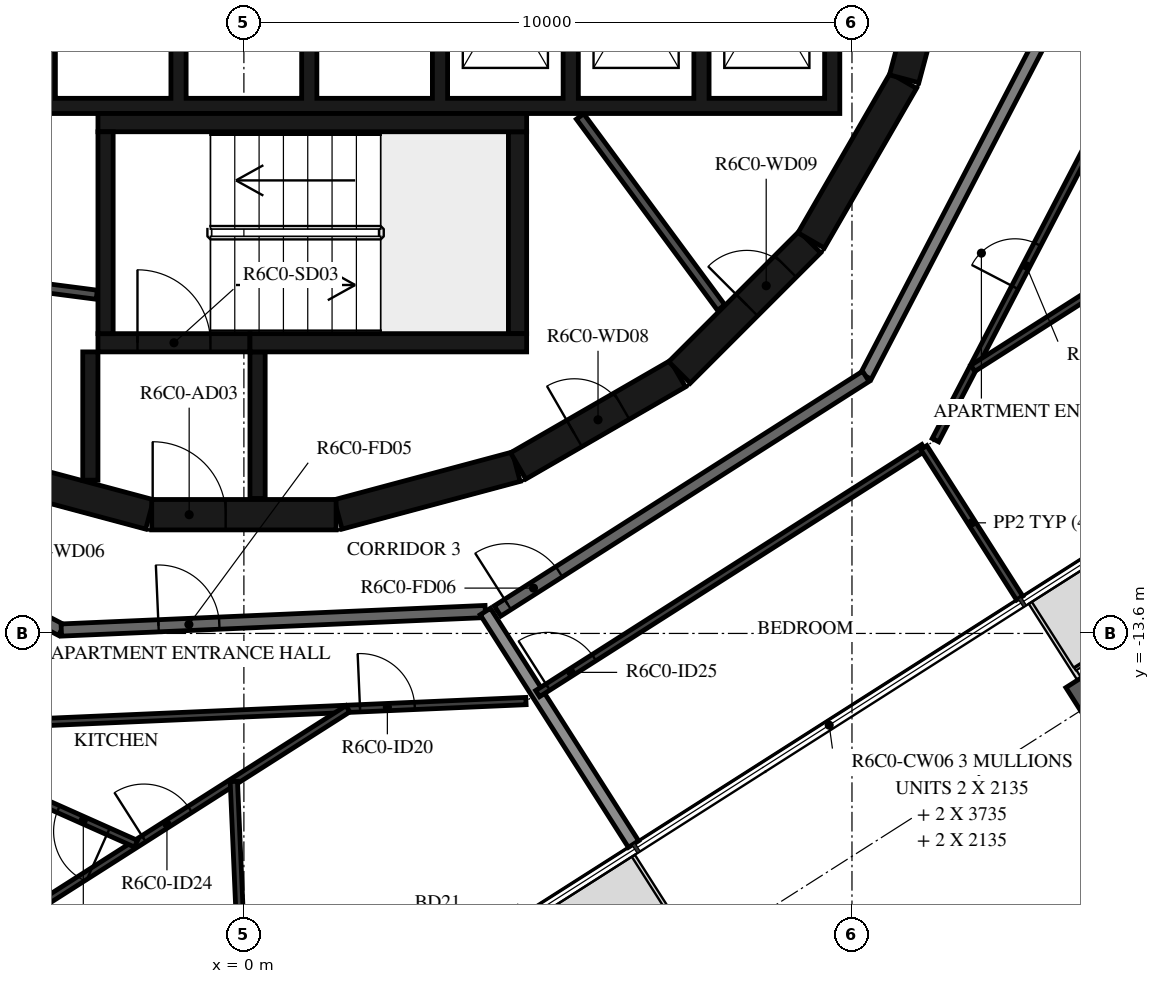
"""IFC4 building model, lengths in metres.
Left out: names, types, materials, properties, quantities, classifications, styles, units other than length and angle.
Written with IfcOpenShell. Run it as: python <this file> out.ifc"""

import sys

from ifc_helpers import new_model, si_unit, direction, frame, frame_2d, origin, origin_2d, place, context, subcontext, project, spatial, polyline, rectangle, i_section, outline, extrude, element, fill, save


model = new_model("IFC4")
c1 = context("Model", 3, precision=1e-05, world=origin(), true_north=direction((0.0, 1.0)))
c2 = subcontext(c1, "Body", "Model", "MODEL_VIEW")
j1 = project(units=[si_unit("LENGTHUNIT", "METRE"), si_unit("PLANEANGLEUNIT", "RADIAN")], contexts=[c1])
p1 = place(None, origin())
s1 = spatial("IfcSite", under=j1, at=p1, CompositionType="ELEMENT")
p2 = place(p1, origin())
s2 = spatial("IfcBuilding", under=s1, at=p2, CompositionType="ELEMENT")
p3 = place(p2, frame((0.0, 0.0, 247.7)))
s3 = spatial("IfcBuildingStorey", under=s2, at=p3, CompositionType="ELEMENT", Elevation=247.7)
p4 = place(p3, frame((13.886, -14.79, -0.38), z_axis=(0.0, 0.0, 1.0), x_axis=(-0.843391139633, -0.537300088953, 0.0)))
e1 = element("IfcColumn", 1, at=p4, inside=s3, PredefinedType="COLUMN", context=c2, shape_type="SweptSolid", body=[
    extrude(i_section(OverallWidth=0.3, OverallDepth=0.9, WebThickness=0.019, FlangeThickness=0.035, FilletRadius=0.03, at=origin_2d()), origin(), (0.0, 0.0, 1.0), 3.5),
])
p5 = place(p3, frame((1.55, -11.643, 0.0), z_axis=(0.0, 0.0, 1.0), x_axis=(0.965948410781, 0.258734743916, 0.0)))
e2 = element("IfcWall", 2, at=p5, inside=s3, PredefinedType="SHEAR", context=c2, shape_type="SweptSolid", body=[
    extrude(rectangle(XDim=3.033, YDim=0.5, at=frame_2d((1.516, 0.0))), origin(), (0.0, 0.0, 1.0), 3.12),
])
p6 = place(p3, frame((4.51, -10.845, 0.0), z_axis=(0.0, 0.0, 1.0), x_axis=(0.865975092491, 0.500087131594, 0.0)))
e3 = element("IfcWall", 3, at=p6, inside=s3, PredefinedType="SHEAR", context=c2, shape_type="SweptSolid", body=[
    extrude(rectangle(XDim=3.033, YDim=0.5, at=frame_2d((1.516, 0.0))), origin(), (0.0, 0.0, 1.0), 3.12),
])
p7 = place(p6, frame((1.066, 0.0, 0.0)))
e4 = element("IfcOpeningElement", 4, at=p7, cuts=e3, PredefinedType="OPENING", context=c2, shape_type="SweptSolid", body=[
    extrude(rectangle(XDim=0.9, YDim=2.1, at=frame_2d((0.45, 1.05))), frame((0.0, 0.26, 0.0), z_axis=(0.0, -1.0, 0.0), x_axis=(1.0, 0.0, 0.0)), (0.0, 0.0, 1.0), 0.52),
])
p8 = place(p3, frame((7.164, -9.308, 0.0), z_axis=(0.0, 0.0, 1.0), x_axis=(0.707106781187, 0.707106781187, 0.0)))
e5 = element("IfcWall", 5, at=p8, inside=s3, PredefinedType="SHEAR", context=c2, shape_type="SweptSolid", body=[
    extrude(rectangle(XDim=3.032, YDim=0.5, at=frame_2d((1.516, 0.0))), origin(), (0.0, 0.0, 1.0), 3.12),
])
p9 = place(p8, frame((1.566, 0.0, 0.0)))
e6 = element("IfcOpeningElement", 6, at=p9, cuts=e5, PredefinedType="OPENING", context=c2, shape_type="SweptSolid", body=[
    extrude(rectangle(XDim=0.9, YDim=2.1, at=frame_2d((0.45, 1.05))), frame((0.0, 0.26, 0.0), z_axis=(0.0, -1.0, 0.0), x_axis=(1.0, 0.0, 0.0)), (0.0, 0.0, 1.0), 0.52),
])
for number, where, z_axis, x_axis in (
    (7, (9.329, -7.137, 0.0), (0.0, 0.0, 1.0), (0.5, 0.866, 0.0)),
    (8, (10.858, -4.479, 0.0), (0.0, 0.0, 1.0), (0.259, 0.966, 0.0)),
    (9, (-4.479, -10.858, 0.0), (0.0, 0.0, 1.0), (0.966, -0.259, 0.0)),
):
    element("IfcWall", number, at=place(p3, frame(where, z_axis=z_axis, x_axis=x_axis)), inside=s3, PredefinedType="SHEAR", context=c2, shape_type="SweptSolid", body=[
        extrude(rectangle(XDim=3.033, YDim=0.5, at=frame_2d((1.516, 0.0))), origin(), (0.0, 0.0, 1.0), 3.12),
    ])
p10 = place(p3, frame((-1.516, -11.647, 0.0), z_axis=(0.0, 0.0, 1.0), x_axis=(1.0, 0.0, 0.0)))
e10 = element("IfcWall", 10, at=p10, inside=s3, PredefinedType="SHEAR", context=c2, shape_type="SweptSolid", body=[
    extrude(rectangle(XDim=3.033, YDim=0.5, at=frame_2d((1.516, 0.0))), origin(), (0.0, 0.0, 1.0), 3.12),
])
p11 = place(p10, frame((0.016, 0.0, 0.0)))
e11 = element("IfcOpeningElement", 11, at=p11, cuts=e10, PredefinedType="OPENING", context=c2, shape_type="SweptSolid", body=[
    extrude(rectangle(XDim=1.2, YDim=2.1, at=frame_2d((0.6, 1.05))), frame((0.0, 0.26, 0.0), z_axis=(0.0, -1.0, 0.0), x_axis=(1.0, 0.0, 0.0)), (0.0, 0.0, 1.0), 0.52),
])
p12 = place(p3, frame((-2.275, -8.67, 0.0), z_axis=(0.0, 0.0, 1.0), x_axis=(0.0, 1.0, 0.0)))
e12 = element("IfcWall", 12, at=p12, inside=s3, PredefinedType="SHEAR", context=c2, shape_type="SweptSolid", body=[
    extrude(rectangle(XDim=3.32, YDim=0.25, at=frame_2d((1.66, 0.0))), origin(), (0.0, 0.0, 1.0), 3.12),
])
p13 = place(p3, frame((-2.4, -5.2, 0.0), z_axis=(0.0, 0.0, 1.0), x_axis=(1.0, 0.0, 0.0)))
e13 = element("IfcWall", 13, at=p13, inside=s3, PredefinedType="SHEAR", context=c2, shape_type="SweptSolid", body=[
    extrude(rectangle(XDim=7.05, YDim=0.3, at=frame_2d((3.525, 0.0))), origin(), (0.0, 0.0, 1.0), 3.12),
])
p14 = place(p3, frame((4.5, -8.67, 0.0), z_axis=(0.0, 0.0, 1.0), x_axis=(0.0, 1.0, 0.0)))
e14 = element("IfcWall", 14, at=p14, inside=s3, PredefinedType="SHEAR", context=c2, shape_type="SweptSolid", body=[
    extrude(rectangle(XDim=3.32, YDim=0.3, at=frame_2d((1.66, 0.0))), origin(), (0.0, 0.0, 1.0), 3.12),
])
p15 = place(p3, frame((0.1, -8.82, 0.0), z_axis=(0.0, 0.0, 1.0), x_axis=(1.0, 0.0, 0.0)))
e15 = element("IfcWall", 15, at=p15, inside=s3, PredefinedType="SHEAR", context=c2, shape_type="SweptSolid", body=[
    extrude(rectangle(XDim=4.55, YDim=0.3, at=frame_2d((2.275, 0.0))), origin(), (0.0, 0.0, 1.0), 3.12),
])
p16 = place(p3, frame((-2.4, -8.82, 0.0), z_axis=(0.0, 0.0, 1.0), x_axis=(1.0, 0.0, 0.0)))
e16 = element("IfcWall", 16, at=p16, inside=s3, PredefinedType="SHEAR", context=c2, shape_type="SweptSolid", body=[
    extrude(rectangle(XDim=2.5, YDim=0.3, at=frame_2d((1.25, 0.0))), origin(), (0.0, 0.0, 1.0), 3.12),
])
p17 = place(p16, frame((0.65, 0.0, 0.0)))
e17 = element("IfcOpeningElement", 17, at=p17, cuts=e16, PredefinedType="OPENING", context=c2, shape_type="SweptSolid", body=[
    extrude(rectangle(XDim=1.2, YDim=2.1, at=frame_2d((0.6, 1.05))), frame((0.0, 0.16, 0.0), z_axis=(0.0, -1.0, 0.0), x_axis=(1.0, 0.0, 0.0)), (0.0, 0.0, 1.0), 0.32),
])
p18 = place(p3, frame((-2.525, -8.97, 0.0), z_axis=(0.0, 0.0, 1.0), x_axis=(0.0, -1.0, 0.0)))
e18 = element("IfcWall", 18, at=p18, inside=s3, PredefinedType="SHEAR", context=c2, shape_type="SweptSolid", body=[
    extrude(rectangle(XDim=2.11, YDim=0.25, at=frame_2d((1.055, 0.0))), origin(), (0.0, 0.0, 1.0), 3.12),
])
p19 = place(p3, frame((0.225, -8.97, 0.0), z_axis=(0.0, 0.0, 1.0), x_axis=(0.0, -1.0, 0.0)))
e19 = element("IfcWall", 19, at=p19, inside=s3, PredefinedType="SHEAR", context=c2, shape_type="SweptSolid", body=[
    extrude(rectangle(XDim=2.41, YDim=0.25, at=frame_2d((1.205, 0.0))), origin(), (0.0, 0.0, 1.0), 3.12),
])
p20 = place(p3, origin())
e20 = element("IfcWall", 20, at=p20, inside=s3, PredefinedType="SHEAR", context=c2, shape_type="SweptSolid", body=[
    extrude(outline(polyline([(9.8, -5.05), (9.8, -4.8), (9.8, -1.9), (9.55, -1.9), (9.55, -4.8), (7.65, -4.8), (7.65, -1.9), (7.4, -1.9), (7.4, -4.8), (5.5, -4.8), (5.5, -1.9), (5.25, -1.9), (5.25, -4.8), (3.35, -4.8), (3.35, -1.9), (3.1, -1.9), (3.1, -4.8), (1.2, -4.8), (1.2, -1.9), (0.95, -1.9), (0.95, -4.8), (-0.95, -4.8), (-0.95, -1.9), (-1.2, -1.9), (-1.2, -4.8), (-3.1, -4.8), (-3.1, -1.9), (-3.35, -1.9), (-3.35, -4.8), (-5.25, -4.8), (-5.25, -1.9), (-5.5, -1.9), (-5.5, -4.8), (-7.4, -4.8), (-7.4, -1.9), (-7.65, -1.9), (-7.65, -4.8), (-9.55, -4.8), (-9.55, -1.9), (-9.8, -1.9), (-9.8, -4.8), (-9.8, -5.05), (9.8, -5.05)])), origin(), (0.0, 0.0, 1.0), 3.12),
])
p21 = place(p3, frame((5.528, -5.098, 0.0), z_axis=(0.0, 0.0, 1.0), x_axis=(0.594034318069, -0.804439698769, 0.0)))
e21 = element("IfcWall", 21, at=p21, inside=s3, PredefinedType="PARTITIONING", context=c2, shape_type="SweptSolid", body=[
    extrude(rectangle(XDim=3.907, YDim=0.15, at=frame_2d((1.953, 0.0))), origin(), (0.0, 0.0, 1.0), 3.12),
])
p22 = place(p3, frame((-4.198, -7.799, 0.0), z_axis=(0.0, 0.0, 1.0), x_axis=(0.991686747293, -0.128675542523, 0.0)))
e22 = element("IfcWall", 22, at=p22, inside=s3, PredefinedType="PARTITIONING", context=c2, shape_type="SweptSolid", body=[
    extrude(rectangle(XDim=1.793, YDim=0.15, at=frame_2d((0.896, 0.0))), origin(), (0.0, 0.0, 1.0), 3.12),
])
p23 = place(p3, frame((10.228, -9.372, 0.0), z_axis=(0.0, 0.0, 1.0), x_axis=(0.461759464021, 0.887005184532, 0.0)))
e23 = element("IfcWall", 23, at=p23, inside=s3, PredefinedType="STANDARD", context=c2, shape_type="SweptSolid", body=[
    extrude(rectangle(XDim=7.181, YDim=0.2, at=frame_2d((3.591, 0.0))), origin(), (0.0, 0.0, 1.0), 3.12),
])
p24 = place(p3, frame((-9.372, -10.228, 0.0), z_axis=(0.0, 0.0, 1.0), x_axis=(0.887005184532, -0.461759464021, 0.0)))
e24 = element("IfcWall", 24, at=p24, inside=s3, PredefinedType="STANDARD", context=c2, shape_type="SweptSolid", body=[
    extrude(rectangle(XDim=7.181, YDim=0.2, at=frame_2d((3.591, 0.0))), origin(), (0.0, 0.0, 1.0), 3.12),
])
p25 = place(p24, frame((2.391, 0.0, 0.0)))
e25 = element("IfcOpeningElement", 25, at=p25, cuts=e24, PredefinedType="OPENING", context=c2, shape_type="SweptSolid", body=[
    extrude(rectangle(XDim=1.0, YDim=2.1, at=frame_2d((0.5, 1.05))), frame((0.0, 0.11, 0.0), z_axis=(0.0, -1.0, 0.0), x_axis=(1.0, 0.0, 0.0)), (0.0, 0.0, 1.0), 0.22),
])
p26 = place(p3, frame((-3.003, -13.544, 0.0), z_axis=(0.0, 0.0, 1.0), x_axis=(0.999048221872, 0.043619380718, 0.0)))
e26 = element("IfcWall", 26, at=p26, inside=s3, PredefinedType="STANDARD", context=c2, shape_type="SweptSolid", body=[
    extrude(rectangle(XDim=6.979, YDim=0.2, at=frame_2d((3.49, 0.0))), origin(), (0.0, 0.0, 1.0), 3.12),
])
p27 = place(p26, frame((1.6, 0.0, 0.0)))
e27 = element("IfcOpeningElement", 27, at=p27, cuts=e26, PredefinedType="OPENING", context=c2, shape_type="SweptSolid", body=[
    extrude(rectangle(XDim=1.0, YDim=2.1, at=frame_2d((0.5, 1.05))), frame((0.0, 0.11, 0.0), z_axis=(0.0, -1.0, 0.0), x_axis=(1.0, 0.0, 0.0)), (0.0, 0.0, 1.0), 0.22),
])
p28 = place(p3, frame((4.172, -13.231, 0.0), z_axis=(0.0, 0.0, 1.0), x_axis=(0.843388394728, 0.537304397561, 0.0)))
e28 = element("IfcWall", 28, at=p28, inside=s3, PredefinedType="STANDARD", context=c2, shape_type="SweptSolid", body=[
    extrude(rectangle(XDim=7.181, YDim=0.2, at=frame_2d((3.59, 0.0))), origin(), (0.0, 0.0, 1.0), 3.12),
])
p29 = place(p28, frame((0.2, 0.0, 0.0)))
e29 = element("IfcOpeningElement", 29, at=p29, cuts=e28, PredefinedType="OPENING", context=c2, shape_type="SweptSolid", body=[
    extrude(rectangle(XDim=1.0, YDim=2.1, at=frame_2d((0.5, 1.05))), frame((0.0, 0.11, 0.0), z_axis=(0.0, -1.0, 0.0), x_axis=(1.0, 0.0, 0.0)), (0.0, 0.0, 1.0), 0.22),
])
p30 = place(p3, frame((6.407, -17.064, 0.0), z_axis=(0.0, 0.0, 1.0), x_axis=(-0.537324777979, 0.843375410461, 0.0)))
e30 = element("IfcWall", 30, at=p30, inside=s3, PredefinedType="STANDARD", context=c2, shape_type="SweptSolid", body=[
    extrude(rectangle(XDim=4.535, YDim=0.2, at=frame_2d((2.268, 0.0))), origin(), (0.0, 0.0, 1.0), 2.73),
])
p31 = place(p3, frame((-3.339, -15.06, 0.0), z_axis=(0.0, 0.0, 1.0), x_axis=(0.999047716945, 0.043630943905, 0.0)))
e31 = element("IfcWall", 31, at=p31, inside=s3, PredefinedType="PARTITIONING", context=c2, shape_type="SweptSolid", body=[
    extrude(rectangle(XDim=7.985, YDim=0.12, at=frame_2d((3.992, 0.0))), origin(), (0.0, 0.0, 1.0), 3.12),
])
p32 = place(p31, frame((5.253, 0.0, 0.0)))
e32 = element("IfcOpeningElement", 32, at=p32, cuts=e31, PredefinedType="OPENING", context=c2, shape_type="SweptSolid", body=[
    extrude(rectangle(XDim=0.9, YDim=2.1, at=frame_2d((0.45, 1.05))), frame((0.0, 0.07, 0.0), z_axis=(0.0, -1.0, 0.0), x_axis=(1.0, 0.0, 0.0)), (0.0, 0.0, 1.0), 0.14),
])
p33 = place(p3, frame((-6.932, -20.345, 0.0), z_axis=(0.0, 0.0, 1.0), x_axis=(0.843388627156, 0.537304032726, 0.0)))
e33 = element("IfcWall", 33, at=p33, inside=s3, PredefinedType="PARTITIONING", context=c2, shape_type="SweptSolid", body=[
    extrude(rectangle(XDim=10.246, YDim=0.12, at=frame_2d((5.123, 0.0))), origin(), (0.0, 0.0, 1.0), 3.12),
])
p34 = place(p33, frame((2.138, 0.0, 0.0)))
e34 = element("IfcOpeningElement", 34, at=p34, cuts=e33, PredefinedType="OPENING", context=c2, shape_type="SweptSolid", body=[
    extrude(rectangle(XDim=0.9, YDim=2.1, at=frame_2d((0.45, 1.05))), frame((0.0, 0.07, 0.0), z_axis=(0.0, -1.0, 0.0), x_axis=(1.0, 0.0, 0.0)), (0.0, 0.0, 1.0), 0.14),
])
p35 = place(p33, frame((6.268, 0.0, 0.0)))
e35 = element("IfcOpeningElement", 35, at=p35, cuts=e33, PredefinedType="OPENING", context=c2, shape_type="SweptSolid", body=[
    extrude(rectangle(XDim=0.9, YDim=2.1, at=frame_2d((0.45, 1.05))), frame((0.0, 0.07, 0.0), z_axis=(0.0, -1.0, 0.0), x_axis=(1.0, 0.0, 0.0)), (0.0, 0.0, 1.0), 0.14),
])
p36 = place(p3, frame((-1.773, -17.059, 0.0), z_axis=(0.0, 0.0, 1.0), x_axis=(-0.913279926902, 0.407332511736, 0.0)))
e36 = element("IfcWall", 36, at=p36, inside=s3, PredefinedType="PARTITIONING", context=c2, shape_type="SweptSolid", body=[
    extrude(rectangle(XDim=6.315, YDim=0.12, at=frame_2d((3.158, 0.0))), origin(), (0.0, 0.0, 1.0), 3.12),
])
p37 = place(p36, frame((0.5, 0.0, 0.0)))
e37 = element("IfcOpeningElement", 37, at=p37, cuts=e36, PredefinedType="OPENING", context=c2, shape_type="SweptSolid", body=[
    extrude(rectangle(XDim=0.9, YDim=2.1, at=frame_2d((0.45, 1.05))), frame((0.0, 0.07, 0.0), z_axis=(0.0, -1.0, 0.0), x_axis=(1.0, 0.0, 0.0)), (0.0, 0.0, 1.0), 0.14),
])
p38 = place(p3, frame((0.056, -21.11, 0.0), z_axis=(0.0, 0.0, 1.0), x_axis=(-0.043583193193, 0.999049801197, 0.0)))
e38 = element("IfcWall", 38, at=p38, inside=s3, PredefinedType="PARTITIONING", context=c2, shape_type="SweptSolid", body=[
    extrude(rectangle(XDim=5.081, YDim=0.12, at=frame_2d((2.541, 0.0))), origin(), (0.0, 0.0, 1.0), 3.12),
])
p39 = place(p3, frame((4.83, -14.59, 0.0), z_axis=(0.0, 0.0, 1.0), x_axis=(0.843393042763, 0.537297101629, 0.0)))
e39 = element("IfcWall", 39, at=p39, inside=s3, PredefinedType="PARTITIONING", context=c2, shape_type="SweptSolid", body=[
    extrude(rectangle(XDim=7.53, YDim=0.12, at=frame_2d((3.765, 0.0))), origin(), (0.0, 0.0, 1.0), 3.12),
])
p40 = place(p39, frame((0.2, 0.0, 0.0)))
e40 = element("IfcOpeningElement", 40, at=p40, cuts=e39, PredefinedType="OPENING", context=c2, shape_type="SweptSolid", body=[
    extrude(rectangle(XDim=0.9, YDim=2.1, at=frame_2d((0.45, 1.05))), frame((0.0, 0.07, 0.0), z_axis=(0.0, -1.0, 0.0), x_axis=(1.0, 0.0, 0.0)), (0.0, 0.0, 1.0), 0.14),
])
p41 = place(p3, frame((11.373, -10.421, 0.0), z_axis=(0.0, 0.0, 1.0), x_axis=(0.461738939635, 0.887015868869, 0.0)))
e41 = element("IfcWall", 41, at=p41, inside=s3, PredefinedType="PARTITIONING", context=c2, shape_type="SweptSolid", body=[
    extrude(rectangle(XDim=5.752, YDim=0.12, at=frame_2d((2.876, 0.0))), origin(), (0.0, 0.0, 1.0), 3.12),
])
p42 = place(p41, frame((2.831, 0.0, 0.0)))
e42 = element("IfcOpeningElement", 42, at=p42, cuts=e41, PredefinedType="OPENING", context=c2, shape_type="SweptSolid", body=[
    extrude(rectangle(XDim=0.8, YDim=2.1, at=frame_2d((0.4, 1.05))), frame((0.0, 0.07, 0.0), z_axis=(0.0, -1.0, 0.0), x_axis=(1.0, 0.0, 0.0)), (0.0, 0.0, 1.0), 0.14),
])
p43 = place(p3, frame((12.758, -13.018, 0.0), z_axis=(0.0, 0.0, 1.0), x_axis=(-0.537338423153, 0.843366716798, 0.0)))
e43 = element("IfcWall", 43, at=p43, inside=s3, PredefinedType="PARTITIONING", context=c2, shape_type="SweptSolid", body=[
    extrude(rectangle(XDim=2.934, YDim=0.12, at=frame_2d((1.467, 0.0))), origin(), (0.0, 0.0, 1.0), 2.73),
])
p44 = place(p3, frame((21.837, -2.966, 0.0), z_axis=(0.0, 0.0, 1.0), x_axis=(-0.843394529709, -0.537294767569, 0.0)))
e44 = element("IfcWall", 44, at=p44, inside=s3, PredefinedType="PARTITIONING", context=c2, shape_type="SweptSolid", body=[
    extrude(rectangle(XDim=11.678, YDim=0.12, at=frame_2d((5.839, 0.0))), origin(), (0.0, 0.0, 1.0), 3.12),
])
p45 = place(p44, frame((0.2, 0.0, 0.0)))
e45 = element("IfcOpeningElement", 45, at=p45, cuts=e44, PredefinedType="OPENING", context=c2, shape_type="SweptSolid", body=[
    extrude(rectangle(XDim=0.9, YDim=2.1, at=frame_2d((0.45, 1.05))), frame((0.0, 0.07, 0.0), z_axis=(0.0, -1.0, 0.0), x_axis=(1.0, 0.0, 0.0)), (0.0, 0.0, 1.0), 0.14),
])
p46 = place(p17, origin())
e46 = element("IfcDoor", 46, at=p46, inside=s3, OperationType="SINGLE_SWING_LEFT", PredefinedType="DOOR", context=c2, shape_type="SweptSolid", body=[
    extrude(rectangle(XDim=1.2, YDim=2.1, at=frame_2d((0.6, 1.05))), frame((0.0, 0.025, 0.0), z_axis=(0.0, -1.0, 0.0), x_axis=(1.0, 0.0, 0.0)), (0.0, 0.0, 1.0), 0.05),
])
fill(e17, e46)
p47 = place(p11, origin())
e47 = element("IfcDoor", 47, at=p47, inside=s3, OperationType="SINGLE_SWING_RIGHT", PredefinedType="DOOR", context=c2, shape_type="SweptSolid", body=[
    extrude(rectangle(XDim=1.2, YDim=2.1, at=frame_2d((0.6, 1.05))), frame((0.0, 0.025, 0.0), z_axis=(0.0, -1.0, 0.0), x_axis=(1.0, 0.0, 0.0)), (0.0, 0.0, 1.0), 0.05),
])
fill(e11, e47)
p48 = place(p7, origin())
e48 = element("IfcDoor", 48, at=p48, inside=s3, OperationType="SINGLE_SWING_RIGHT", PredefinedType="DOOR", context=c2, shape_type="SweptSolid", body=[
    extrude(rectangle(XDim=0.9, YDim=2.1, at=frame_2d((0.45, 1.05))), frame((0.0, 0.025, 0.0), z_axis=(0.0, -1.0, 0.0), x_axis=(1.0, 0.0, 0.0)), (0.0, 0.0, 1.0), 0.05),
])
fill(e4, e48)
p49 = place(p9, origin())
e49 = element("IfcDoor", 49, at=p49, inside=s3, OperationType="SINGLE_SWING_LEFT", PredefinedType="DOOR", context=c2, shape_type="SweptSolid", body=[
    extrude(rectangle(XDim=0.9, YDim=2.1, at=frame_2d((0.45, 1.05))), frame((0.0, 0.025, 0.0), z_axis=(0.0, -1.0, 0.0), x_axis=(1.0, 0.0, 0.0)), (0.0, 0.0, 1.0), 0.05),
])
fill(e6, e49)
p50 = place(p27, origin())
e50 = element("IfcDoor", 50, at=p50, inside=s3, OperationType="SINGLE_SWING_LEFT", PredefinedType="DOOR", context=c2, shape_type="SweptSolid", body=[
    extrude(rectangle(XDim=1.0, YDim=2.1, at=frame_2d((0.5, 1.05))), frame((0.0, 0.025, 0.0), z_axis=(0.0, -1.0, 0.0), x_axis=(1.0, 0.0, 0.0)), (0.0, 0.0, 1.0), 0.05),
])
fill(e27, e50)
p51 = place(p32, origin())
e51 = element("IfcDoor", 51, at=p51, inside=s3, OperationType="SINGLE_SWING_LEFT", PredefinedType="DOOR", context=c2, shape_type="SweptSolid", body=[
    extrude(rectangle(XDim=0.9, YDim=2.1, at=frame_2d((0.45, 1.05))), frame((0.0, 0.025, 0.0), z_axis=(0.0, -1.0, 0.0), x_axis=(1.0, 0.0, 0.0)), (0.0, 0.0, 1.0), 0.05),
])
fill(e32, e51)
p52 = place(p37, origin())
e52 = element("IfcDoor", 52, at=p52, inside=s3, OperationType="SINGLE_SWING_LEFT", PredefinedType="DOOR", context=c2, shape_type="SweptSolid", body=[
    extrude(rectangle(XDim=0.9, YDim=2.1, at=frame_2d((0.45, 1.05))), frame((0.0, 0.025, 0.0), z_axis=(0.0, -1.0, 0.0), x_axis=(1.0, 0.0, 0.0)), (0.0, 0.0, 1.0), 0.05),
])
fill(e37, e52)
p53 = place(p35, origin())
e53 = element("IfcDoor", 53, at=p53, inside=s3, OperationType="SINGLE_SWING_RIGHT", PredefinedType="DOOR", context=c2, shape_type="SweptSolid", body=[
    extrude(rectangle(XDim=0.9, YDim=2.1, at=frame_2d((0.45, 1.05))), frame((0.0, 0.025, 0.0), z_axis=(0.0, -1.0, 0.0), x_axis=(1.0, 0.0, 0.0)), (0.0, 0.0, 1.0), 0.05),
])
fill(e35, e53)
p54 = place(p29, origin())
e54 = element("IfcDoor", 54, at=p54, inside=s3, OperationType="SINGLE_SWING_LEFT", PredefinedType="DOOR", context=c2, shape_type="SweptSolid", body=[
    extrude(rectangle(XDim=1.0, YDim=2.1, at=frame_2d((0.5, 1.05))), frame((0.0, 0.025, 0.0), z_axis=(0.0, -1.0, 0.0), x_axis=(1.0, 0.0, 0.0)), (0.0, 0.0, 1.0), 0.05),
])
fill(e29, e54)
p55 = place(p40, origin())
e55 = element("IfcDoor", 55, at=p55, inside=s3, OperationType="SINGLE_SWING_LEFT", PredefinedType="DOOR", context=c2, shape_type="SweptSolid", body=[
    extrude(rectangle(XDim=0.9, YDim=2.1, at=frame_2d((0.45, 1.05))), frame((0.0, 0.025, 0.0), z_axis=(0.0, -1.0, 0.0), x_axis=(1.0, 0.0, 0.0)), (0.0, 0.0, 1.0), 0.05),
])
fill(e40, e55)
p56 = place(p42, origin())
e56 = element("IfcDoor", 56, at=p56, inside=s3, OperationType="SINGLE_SWING_RIGHT", PredefinedType="DOOR", context=c2, shape_type="SweptSolid", body=[
    extrude(rectangle(XDim=0.8, YDim=2.1, at=frame_2d((0.4, 1.05))), frame((0.0, 0.025, 0.0), z_axis=(0.0, -1.0, 0.0), x_axis=(1.0, 0.0, 0.0)), (0.0, 0.0, 1.0), 0.05),
])
fill(e42, e56)
save(model, sys.argv[1])
